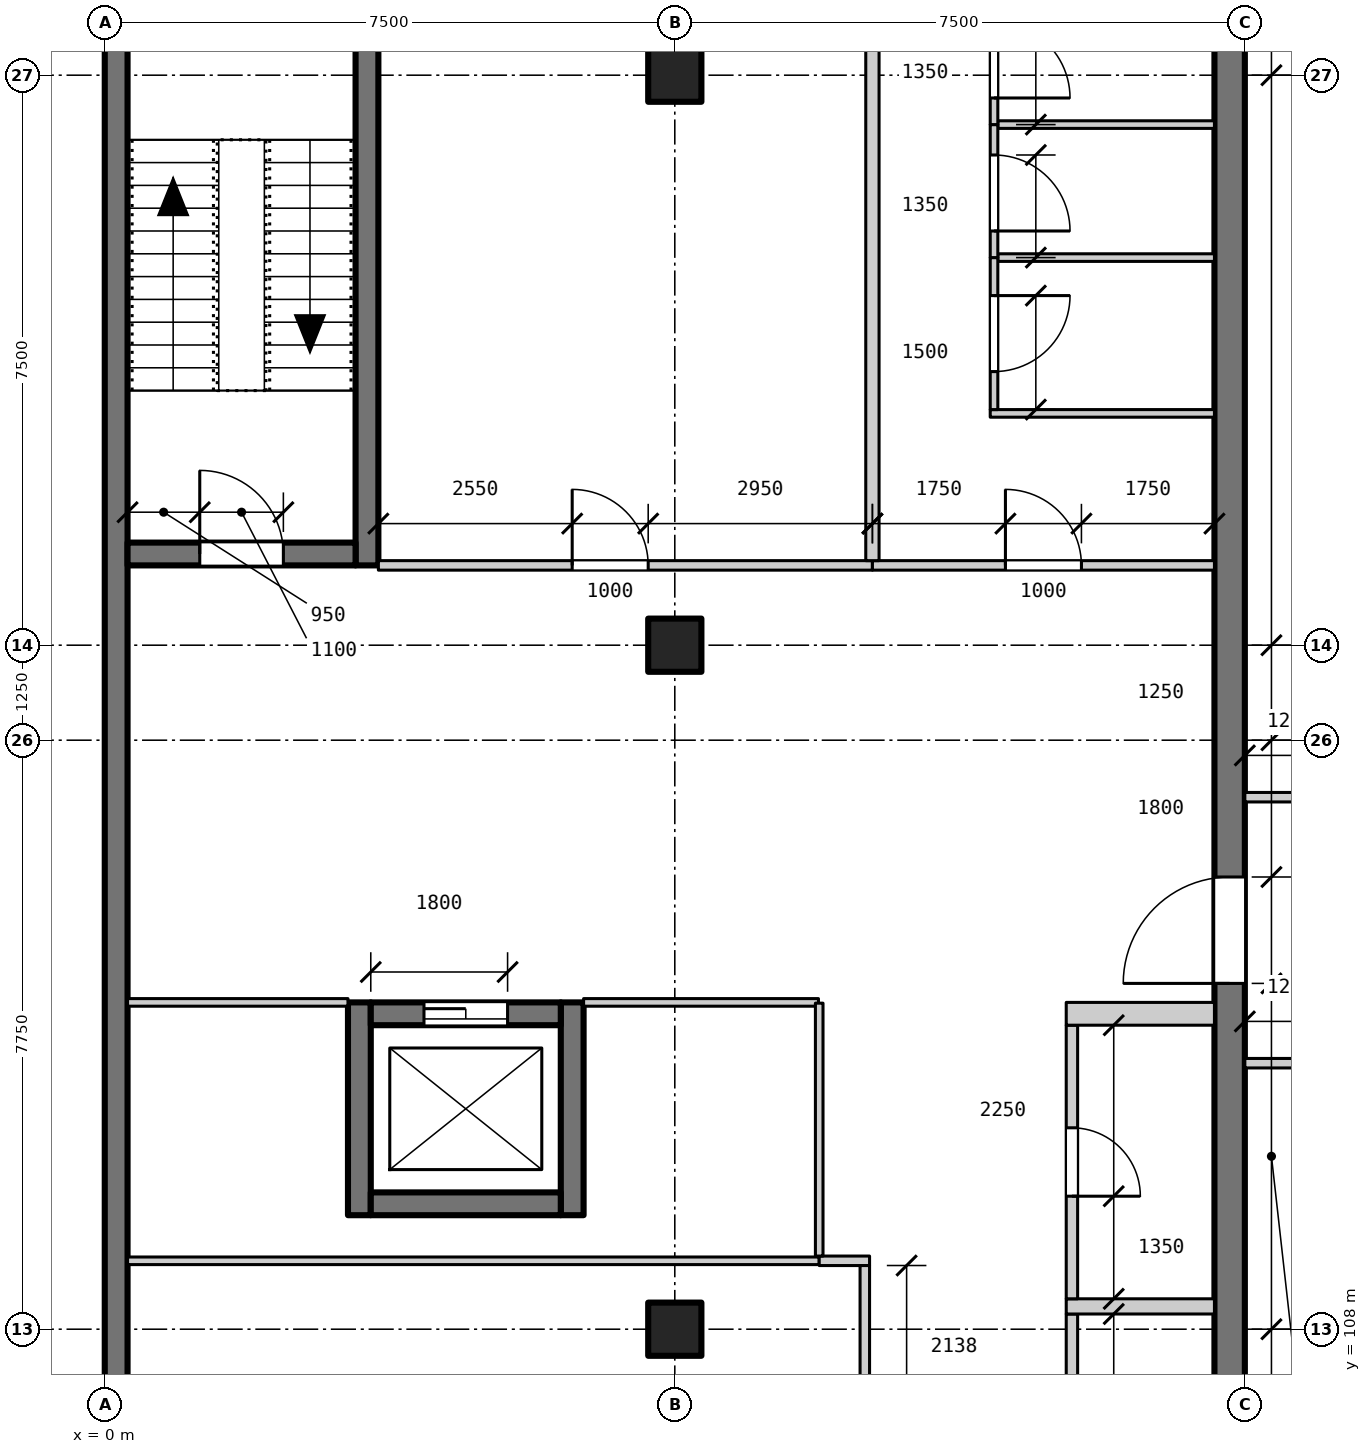
"""IFC4 building model, lengths in metres.
Left out: names, types, materials, properties, quantities, classifications, styles, units other than length and angle.
Written with IfcOpenShell. Run it as: python <this file> out.ifc"""

import sys

from ifc_helpers import new_model, si_unit, direction, frame, frame_2d, origin, origin_2d, place, context, subcontext, project, spatial, rectangle, extrude, element, fill, save


model = new_model("IFC4")
c1 = context("Model", 3, precision=1e-05, world=origin(), true_north=direction((0.0, 1.0)))
c2 = subcontext(c1, "Body", "Model", "MODEL_VIEW")
j1 = project(units=[si_unit("LENGTHUNIT", "METRE"), si_unit("PLANEANGLEUNIT", "RADIAN")], contexts=[c1])
p1 = place(None, origin())
s1 = spatial("IfcSite", under=j1, at=p1, CompositionType="ELEMENT")
p2 = place(p1, origin())
s2 = spatial("IfcBuilding", under=s1, at=p2, CompositionType="ELEMENT")
p3 = place(p2, frame((0.0, 0.0, 6.0)))
s3 = spatial("IfcBuildingStorey", under=s2, at=p3, CompositionType="ELEMENT", Elevation=6.0)
for number, where, z_axis, x_axis in (
    (1, (7.5, 108.0, 0.0), (0.0, 0.0, 1.0), (1.0, 0.0, 0.0)),
    (2, (7.5, 117.0, 0.0), (0.0, 0.0, 1.0), (1.0, 0.0, 0.0)),
    (3, (7.5, 124.5, 0.0), (0.0, 0.0, 1.0), (1.0, 0.0, 0.0)),
):
    element("IfcColumn", number, at=place(p3, frame(where, z_axis=z_axis, x_axis=x_axis)), inside=s3, PredefinedType="COLUMN", context=c2, shape_type="SweptSolid", body=[
        extrude(rectangle(XDim=0.7, YDim=0.7, at=origin_2d()), origin(), (0.0, 0.0, 1.0), 3.9),
    ])
p4 = place(p3, frame((0.15, 18.0, 0.0), z_axis=(0.0, 0.0, 1.0), x_axis=(0.0, 1.0, 0.0)))
e4 = element("IfcWall", 4, at=p4, inside=s3, PredefinedType="SHEAR", context=c2, shape_type="SweptSolid", body=[
    extrude(rectangle(XDim=108.0, YDim=0.3, at=frame_2d((54.0, 0.0))), origin(), (0.0, 0.0, 1.0), 4.2),
])
p5 = place(p3, frame((14.8, 99.0, 0.0), z_axis=(0.0, 0.0, 1.0), x_axis=(0.0, 1.0, 0.0)))
e5 = element("IfcWall", 5, at=p5, inside=s3, PredefinedType="SHEAR", context=c2, shape_type="SweptSolid", body=[
    extrude(rectangle(XDim=26.55, YDim=0.4, at=frame_2d((13.275, 0.0))), origin(), (0.0, 0.0, 1.0), 4.2),
])
p6 = place(p5, frame((13.55, 0.0, 0.0)))
e6 = element("IfcOpeningElement", 6, at=p6, cuts=e5, PredefinedType="OPENING", context=c2, shape_type="SweptSolid", body=[
    extrude(rectangle(XDim=1.4, YDim=2.4, at=frame_2d((0.7, 1.2))), frame((0.0, 0.21, 0.0), z_axis=(0.0, -1.0, 0.0), x_axis=(1.0, 0.0, 0.0)), (0.0, 0.0, 1.0), 0.42),
])
p7 = place(p3, frame((3.45, 118.05, 0.0), z_axis=(0.0, 0.0, 1.0), x_axis=(0.0, 1.0, 0.0)))
e7 = element("IfcWall", 7, at=p7, inside=s3, PredefinedType="SHEAR", context=c2, shape_type="SweptSolid", body=[
    extrude(rectangle(XDim=7.5, YDim=0.3, at=frame_2d((3.75, 0.0))), origin(), (0.0, 0.0, 1.0), 4.2),
])
p8 = place(p3, frame((0.3, 118.2, 0.0), z_axis=(0.0, 0.0, 1.0), x_axis=(1.0, 0.0, 0.0)))
e8 = element("IfcWall", 8, at=p8, inside=s3, PredefinedType="SHEAR", context=c2, shape_type="SweptSolid", body=[
    extrude(rectangle(XDim=3.0, YDim=0.3, at=frame_2d((1.5, 0.0))), origin(), (0.0, 0.0, 1.0), 4.2),
])
p9 = place(p8, frame((0.95, 0.0, 0.0)))
e9 = element("IfcOpeningElement", 9, at=p9, cuts=e8, PredefinedType="OPENING", context=c2, shape_type="SweptSolid", body=[
    extrude(rectangle(XDim=1.1, YDim=2.1, at=frame_2d((0.55, 1.05))), frame((0.0, 0.16, 0.0), z_axis=(0.0, -1.0, 0.0), x_axis=(1.0, 0.0, 0.0)), (0.0, 0.0, 1.0), 0.32),
])
for number, where, z_axis, x_axis in (
    (10, (3.35, 109.5, 0.0), (0.0, 0.0, 1.0), (0.0, 1.0, 0.0)),
    (11, (6.15, 109.5, 0.0), (0.0, 0.0, 1.0), (0.0, 1.0, 0.0)),
):
    element("IfcWall", number, at=place(p3, frame(where, z_axis=z_axis, x_axis=x_axis)), inside=s3, PredefinedType="SHEAR", context=c2, shape_type="SweptSolid", body=[
        extrude(rectangle(XDim=2.8, YDim=0.3, at=frame_2d((1.4, 0.0))), origin(), (0.0, 0.0, 1.0), 4.2),
    ])
p10 = place(p3, frame((3.5, 109.65, 0.0), z_axis=(0.0, 0.0, 1.0), x_axis=(1.0, 0.0, 0.0)))
e12 = element("IfcWall", 12, at=p10, inside=s3, PredefinedType="SHEAR", context=c2, shape_type="SweptSolid", body=[
    extrude(rectangle(XDim=2.5, YDim=0.3, at=frame_2d((1.25, 0.0))), origin(), (0.0, 0.0, 1.0), 4.2),
])
p11 = place(p3, frame((3.5, 112.15, 0.0), z_axis=(0.0, 0.0, 1.0), x_axis=(1.0, 0.0, 0.0)))
e13 = element("IfcWall", 13, at=p11, inside=s3, PredefinedType="SHEAR", context=c2, shape_type="SweptSolid", body=[
    extrude(rectangle(XDim=2.5, YDim=0.3, at=frame_2d((1.25, 0.0))), origin(), (0.0, 0.0, 1.0), 4.2),
])
p12 = place(p11, frame((0.7, 0.0, 0.0)))
e14 = element("IfcOpeningElement", 14, at=p12, cuts=e13, PredefinedType="OPENING", context=c2, shape_type="SweptSolid", body=[
    extrude(rectangle(XDim=1.1, YDim=2.1, at=frame_2d((0.55, 1.05))), frame((0.0, 0.16, 0.0), z_axis=(0.0, -1.0, 0.0), x_axis=(1.0, 0.0, 0.0)), (0.0, 0.0, 1.0), 0.32),
])
p13 = place(p3, frame((12.725, 104.4, 0.0), z_axis=(0.0, 0.0, 1.0), x_axis=(0.0, 1.0, 0.0)))
e15 = element("IfcWall", 15, at=p13, inside=s3, PredefinedType="PARTITIONING", context=c2, shape_type="SweptSolid", body=[
    extrude(rectangle(XDim=3.8, YDim=0.15, at=frame_2d((1.9, 0.0))), origin(), (0.0, 0.0, 1.0), 3.9),
])
p14 = place(p13, frame((1.45, 0.0, 0.0)))
e16 = element("IfcOpeningElement", 16, at=p14, cuts=e15, PredefinedType="OPENING", context=c2, shape_type="SweptSolid", body=[
    extrude(rectangle(XDim=0.9, YDim=2.1, at=frame_2d((0.45, 1.05))), frame((0.0, 0.085, 0.0), z_axis=(0.0, -1.0, 0.0), x_axis=(1.0, 0.0, 0.0)), (0.0, 0.0, 1.0), 0.17),
])
p15 = place(p3, frame((12.65, 108.3, 0.0), z_axis=(0.0, 0.0, 1.0), x_axis=(1.0, 0.0, 0.0)))
e17 = element("IfcWall", 17, at=p15, inside=s3, PredefinedType="PARTITIONING", context=c2, shape_type="SweptSolid", body=[
    extrude(rectangle(XDim=1.95, YDim=0.2, at=frame_2d((0.975, 0.0))), origin(), (0.0, 0.0, 1.0), 3.9),
])
p16 = place(p3, frame((12.725, 108.4, 0.0), z_axis=(0.0, 0.0, 1.0), x_axis=(0.0, 1.0, 0.0)))
e18 = element("IfcWall", 18, at=p16, inside=s3, PredefinedType="PARTITIONING", context=c2, shape_type="SweptSolid", body=[
    extrude(rectangle(XDim=3.6, YDim=0.15, at=frame_2d((1.8, 0.0))), origin(), (0.0, 0.0, 1.0), 3.9),
])
p17 = place(p16, frame((1.35, 0.0, 0.0)))
e19 = element("IfcOpeningElement", 19, at=p17, cuts=e18, PredefinedType="OPENING", context=c2, shape_type="SweptSolid", body=[
    extrude(rectangle(XDim=0.9, YDim=2.1, at=frame_2d((0.45, 1.05))), frame((0.0, 0.085, 0.0), z_axis=(0.0, -1.0, 0.0), x_axis=(1.0, 0.0, 0.0)), (0.0, 0.0, 1.0), 0.17),
])
p18 = place(p3, frame((12.65, 112.15, 0.0), z_axis=(0.0, 0.0, 1.0), x_axis=(1.0, 0.0, 0.0)))
e20 = element("IfcWall", 20, at=p18, inside=s3, PredefinedType="PARTITIONING", context=c2, shape_type="SweptSolid", body=[
    extrude(rectangle(XDim=1.95, YDim=0.3, at=frame_2d((0.975, 0.0))), origin(), (0.0, 0.0, 1.0), 3.9),
])
p19 = place(p3, frame((0.3, 108.9, 0.0), z_axis=(0.0, 0.0, 1.0), x_axis=(1.0, 0.0, 0.0)))
e21 = element("IfcWall", 21, at=p19, inside=s3, PredefinedType="PARTITIONING", context=c2, shape_type="SweptSolid", body=[
    extrude(rectangle(XDim=9.1, YDim=0.1, at=frame_2d((4.55, 0.0))), origin(), (0.0, 0.0, 1.0), 3.9),
])
p20 = place(p3, frame((9.4, 108.9, 0.0), z_axis=(0.0, 0.0, 1.0), x_axis=(1.0, 0.0, 0.0)))
e22 = element("IfcWall", 22, at=p20, inside=s3, PredefinedType="PARTITIONING", context=c2, shape_type="SweptSolid", body=[
    extrude(rectangle(XDim=0.663, YDim=0.125, at=frame_2d((0.331, 0.0))), origin(), (0.0, 0.0, 1.0), 3.9),
])
p21 = place(p3, frame((15.0, 111.5, 0.0), z_axis=(0.0, 0.0, 1.0), x_axis=(1.0, 0.0, 0.0)))
e23 = element("IfcWall", 23, at=p21, inside=s3, PredefinedType="PARTITIONING", context=c2, shape_type="SweptSolid", body=[
    extrude(rectangle(XDim=14.0, YDim=0.125, at=frame_2d((7.0, 0.0))), origin(), (0.0, 0.0, 1.0), 3.9),
])
p22 = place(p21, frame((1.2, 0.0, 0.0)))
e24 = element("IfcOpeningElement", 24, at=p22, cuts=e23, PredefinedType="OPENING", context=c2, shape_type="SweptSolid", body=[
    extrude(rectangle(XDim=1.8, YDim=2.1, at=frame_2d((0.9, 1.05))), frame((0.0, 0.073, 0.0), z_axis=(0.0, -1.0, 0.0), x_axis=(1.0, 0.0, 0.0)), (0.0, 0.0, 1.0), 0.145),
])
p23 = place(p21, frame((11.0, 0.0, 0.0)))
e25 = element("IfcOpeningElement", 25, at=p23, cuts=e23, PredefinedType="OPENING", context=c2, shape_type="SweptSolid", body=[
    extrude(rectangle(XDim=1.8, YDim=2.1, at=frame_2d((0.9, 1.05))), frame((0.0, 0.073, 0.0), z_axis=(0.0, -1.0, 0.0), x_axis=(1.0, 0.0, 0.0)), (0.0, 0.0, 1.0), 0.145),
])
p24 = place(p3, frame((0.3, 112.3, 0.0), z_axis=(0.0, 0.0, 1.0), x_axis=(1.0, 0.0, 0.0)))
e26 = element("IfcWall", 26, at=p24, inside=s3, PredefinedType="PARTITIONING", context=c2, shape_type="SweptSolid", body=[
    extrude(rectangle(XDim=2.9, YDim=0.1, at=frame_2d((1.45, 0.0))), origin(), (0.0, 0.0, 1.0), 3.9),
])
p25 = place(p3, frame((6.3, 112.3, 0.0), z_axis=(0.0, 0.0, 1.0), x_axis=(1.0, 0.0, 0.0)))
e27 = element("IfcWall", 27, at=p25, inside=s3, PredefinedType="PARTITIONING", context=c2, shape_type="SweptSolid", body=[
    extrude(rectangle(XDim=3.09, YDim=0.1, at=frame_2d((1.545, 0.0))), origin(), (0.0, 0.0, 1.0), 3.9),
])
p26 = place(p3, frame((15.0, 115.0, 0.0), z_axis=(0.0, 0.0, 1.0), x_axis=(1.0, 0.0, 0.0)))
e28 = element("IfcWall", 28, at=p26, inside=s3, PredefinedType="PARTITIONING", context=c2, shape_type="SweptSolid", body=[
    extrude(rectangle(XDim=14.0, YDim=0.125, at=frame_2d((7.0, 0.0))), origin(), (0.0, 0.0, 1.0), 3.9),
])
p27 = place(p26, frame((1.2, 0.0, 0.0)))
e29 = element("IfcOpeningElement", 29, at=p27, cuts=e28, PredefinedType="OPENING", context=c2, shape_type="SweptSolid", body=[
    extrude(rectangle(XDim=1.8, YDim=2.1, at=frame_2d((0.9, 1.05))), frame((0.0, 0.073, 0.0), z_axis=(0.0, -1.0, 0.0), x_axis=(1.0, 0.0, 0.0)), (0.0, 0.0, 1.0), 0.145),
])
p28 = place(p26, frame((11.0, 0.0, 0.0)))
e30 = element("IfcOpeningElement", 30, at=p28, cuts=e28, PredefinedType="OPENING", context=c2, shape_type="SweptSolid", body=[
    extrude(rectangle(XDim=1.8, YDim=2.1, at=frame_2d((0.9, 1.05))), frame((0.0, 0.073, 0.0), z_axis=(0.0, -1.0, 0.0), x_axis=(1.0, 0.0, 0.0)), (0.0, 0.0, 1.0), 0.145),
])
p29 = place(p3, frame((3.6, 118.05, 0.0), z_axis=(0.0, 0.0, 1.0), x_axis=(1.0, 0.0, 0.0)))
e31 = element("IfcWall", 31, at=p29, inside=s3, PredefinedType="PARTITIONING", context=c2, shape_type="SweptSolid", body=[
    extrude(rectangle(XDim=6.5, YDim=0.125, at=frame_2d((3.25, 0.0))), origin(), (0.0, 0.0, 1.0), 3.9),
])
p30 = place(p29, frame((2.55, 0.0, 0.0)))
e32 = element("IfcOpeningElement", 32, at=p30, cuts=e31, PredefinedType="OPENING", context=c2, shape_type="SweptSolid", body=[
    extrude(rectangle(XDim=1.0, YDim=2.1, at=frame_2d((0.5, 1.05))), frame((0.0, 0.073, 0.0), z_axis=(0.0, -1.0, 0.0), x_axis=(1.0, 0.0, 0.0)), (0.0, 0.0, 1.0), 0.145),
])
p31 = place(p3, frame((10.1, 118.05, 0.0), z_axis=(0.0, 0.0, 1.0), x_axis=(1.0, 0.0, 0.0)))
e33 = element("IfcWall", 33, at=p31, inside=s3, PredefinedType="PARTITIONING", context=c2, shape_type="SweptSolid", body=[
    extrude(rectangle(XDim=4.5, YDim=0.125, at=frame_2d((2.25, 0.0))), origin(), (0.0, 0.0, 1.0), 3.9),
])
p32 = place(p31, frame((1.75, 0.0, 0.0)))
e34 = element("IfcOpeningElement", 34, at=p32, cuts=e33, PredefinedType="OPENING", context=c2, shape_type="SweptSolid", body=[
    extrude(rectangle(XDim=1.0, YDim=2.1, at=frame_2d((0.5, 1.05))), frame((0.0, 0.073, 0.0), z_axis=(0.0, -1.0, 0.0), x_axis=(1.0, 0.0, 0.0)), (0.0, 0.0, 1.0), 0.145),
])
p33 = place(p3, frame((11.65, 120.05, 0.0), z_axis=(0.0, 0.0, 1.0), x_axis=(1.0, 0.0, 0.0)))
e35 = element("IfcWall", 35, at=p33, inside=s3, PredefinedType="PARTITIONING", context=c2, shape_type="SweptSolid", body=[
    extrude(rectangle(XDim=2.95, YDim=0.1, at=frame_2d((1.475, 0.0))), origin(), (0.0, 0.0, 1.0), 3.9),
])
for number, where, z_axis, x_axis in (
    (36, (11.75, 122.1, 0.0), (0.0, 0.0, 1.0), (1.0, 0.0, 0.0)),
    (37, (11.75, 123.85, 0.0), (0.0, 0.0, 1.0), (1.0, 0.0, 0.0)),
):
    element("IfcWall", number, at=place(p3, frame(where, z_axis=z_axis, x_axis=x_axis)), inside=s3, PredefinedType="PARTITIONING", context=c2, shape_type="SweptSolid", body=[
        extrude(rectangle(XDim=2.85, YDim=0.1, at=frame_2d((1.425, 0.0))), origin(), (0.0, 0.0, 1.0), 3.9),
    ])
p34 = place(p3, frame((9.4, 108.962, 0.0), z_axis=(0.0, 0.0, 1.0), x_axis=(0.0, 1.0, 0.0)))
e38 = element("IfcWall", 38, at=p34, inside=s3, PredefinedType="PARTITIONING", context=c2, shape_type="SweptSolid", body=[
    extrude(rectangle(XDim=3.328, YDim=0.1, at=frame_2d((1.664, 0.0))), origin(), (0.0, 0.0, 1.0), 3.9),
])
p35 = place(p3, frame((10.0, 103.6, 0.0), z_axis=(0.0, 0.0, 1.0), x_axis=(0.0, 1.0, 0.0)))
e39 = element("IfcWall", 39, at=p35, inside=s3, PredefinedType="PARTITIONING", context=c2, shape_type="SweptSolid", body=[
    extrude(rectangle(XDim=5.237, YDim=0.125, at=frame_2d((2.619, 0.0))), origin(), (0.0, 0.0, 1.0), 3.9),
])
p36 = place(p35, frame((2.1, 0.0, 0.0)))
e40 = element("IfcOpeningElement", 40, at=p36, cuts=e39, PredefinedType="OPENING", context=c2, shape_type="SweptSolid", body=[
    extrude(rectangle(XDim=1.0, YDim=2.1, at=frame_2d((0.5, 1.05))), frame((0.0, 0.073, 0.0), z_axis=(0.0, -1.0, 0.0), x_axis=(1.0, 0.0, 0.0)), (0.0, 0.0, 1.0), 0.145),
])
p37 = place(p3, frame((10.1, 118.113, 0.0), z_axis=(0.0, 0.0, 1.0), x_axis=(0.0, 1.0, 0.0)))
e41 = element("IfcWall", 41, at=p37, inside=s3, PredefinedType="PARTITIONING", context=c2, shape_type="SweptSolid", body=[
    extrude(rectangle(XDim=7.438, YDim=0.175, at=frame_2d((3.719, 0.0))), origin(), (0.0, 0.0, 1.0), 3.9),
])
p38 = place(p3, frame((11.7, 120.1, 0.0), z_axis=(0.0, 0.0, 1.0), x_axis=(0.0, 1.0, 0.0)))
e42 = element("IfcWall", 42, at=p38, inside=s3, PredefinedType="PARTITIONING", context=c2, shape_type="SweptSolid", body=[
    extrude(rectangle(XDim=2.0, YDim=0.1, at=frame_2d((1.0, 0.0))), origin(), (0.0, 0.0, 1.0), 3.9),
])
p39 = place(p38, frame((0.5, 0.0, 0.0)))
e43 = element("IfcOpeningElement", 43, at=p39, cuts=e42, PredefinedType="OPENING", context=c2, shape_type="SweptSolid", body=[
    extrude(rectangle(XDim=1.0, YDim=2.1, at=frame_2d((0.5, 1.05))), frame((0.0, 0.06, 0.0), z_axis=(0.0, -1.0, 0.0), x_axis=(1.0, 0.0, 0.0)), (0.0, 0.0, 1.0), 0.12),
])
p40 = place(p3, frame((11.7, 122.1, 0.0), z_axis=(0.0, 0.0, 1.0), x_axis=(0.0, 1.0, 0.0)))
e44 = element("IfcWall", 44, at=p40, inside=s3, PredefinedType="PARTITIONING", context=c2, shape_type="SweptSolid", body=[
    extrude(rectangle(XDim=1.75, YDim=0.1, at=frame_2d((0.875, 0.0))), origin(), (0.0, 0.0, 1.0), 3.9),
])
p41 = place(p40, frame((0.35, 0.0, 0.0)))
e45 = element("IfcOpeningElement", 45, at=p41, cuts=e44, PredefinedType="OPENING", context=c2, shape_type="SweptSolid", body=[
    extrude(rectangle(XDim=1.0, YDim=2.1, at=frame_2d((0.5, 1.05))), frame((0.0, 0.06, 0.0), z_axis=(0.0, -1.0, 0.0), x_axis=(1.0, 0.0, 0.0)), (0.0, 0.0, 1.0), 0.12),
])
p42 = place(p3, frame((11.7, 123.85, 0.0), z_axis=(0.0, 0.0, 1.0), x_axis=(0.0, 1.0, 0.0)))
e46 = element("IfcWall", 46, at=p42, inside=s3, PredefinedType="PARTITIONING", context=c2, shape_type="SweptSolid", body=[
    extrude(rectangle(XDim=1.7, YDim=0.1, at=frame_2d((0.85, 0.0))), origin(), (0.0, 0.0, 1.0), 3.9),
])
p43 = place(p42, frame((0.35, 0.0, 0.0)))
e47 = element("IfcOpeningElement", 47, at=p43, cuts=e46, PredefinedType="OPENING", context=c2, shape_type="SweptSolid", body=[
    extrude(rectangle(XDim=1.0, YDim=2.1, at=frame_2d((0.5, 1.05))), frame((0.0, 0.06, 0.0), z_axis=(0.0, -1.0, 0.0), x_axis=(1.0, 0.0, 0.0)), (0.0, 0.0, 1.0), 0.12),
])
p44 = place(p17, frame((0.9, 0.0, 0.0), z_axis=(0.0, 0.0, 1.0), x_axis=(-1.0, 0.0, 0.0)))
e48 = element("IfcDoor", 48, at=p44, inside=s3, OperationType="SINGLE_SWING_RIGHT", PredefinedType="DOOR", context=c2, shape_type="SweptSolid", body=[
    extrude(rectangle(XDim=0.9, YDim=2.1, at=frame_2d((0.45, 1.05))), frame((0.0, 0.025, 0.0), z_axis=(0.0, -1.0, 0.0), x_axis=(1.0, 0.0, 0.0)), (0.0, 0.0, 1.0), 0.05),
])
fill(e19, e48)
p45 = place(p6, origin())
e49 = element("IfcDoor", 49, at=p45, inside=s3, OperationType="SINGLE_SWING_LEFT", PredefinedType="DOOR", context=c2, shape_type="SweptSolid", body=[
    extrude(rectangle(XDim=1.4, YDim=2.4, at=frame_2d((0.7, 1.2))), frame((0.0, 0.025, 0.0), z_axis=(0.0, -1.0, 0.0), x_axis=(1.0, 0.0, 0.0)), (0.0, 0.0, 1.0), 0.05),
])
fill(e6, e49)
p46 = place(p30, origin())
e50 = element("IfcDoor", 50, at=p46, inside=s3, OperationType="SINGLE_SWING_LEFT", PredefinedType="DOOR", context=c2, shape_type="SweptSolid", body=[
    extrude(rectangle(XDim=1.0, YDim=2.1, at=frame_2d((0.5, 1.05))), frame((0.0, 0.025, 0.0), z_axis=(0.0, -1.0, 0.0), x_axis=(1.0, 0.0, 0.0)), (0.0, 0.0, 1.0), 0.05),
])
fill(e32, e50)
p47 = place(p32, origin())
e51 = element("IfcDoor", 51, at=p47, inside=s3, OperationType="SINGLE_SWING_LEFT", PredefinedType="DOOR", context=c2, shape_type="SweptSolid", body=[
    extrude(rectangle(XDim=1.0, YDim=2.1, at=frame_2d((0.5, 1.05))), frame((0.0, 0.025, 0.0), z_axis=(0.0, -1.0, 0.0), x_axis=(1.0, 0.0, 0.0)), (0.0, 0.0, 1.0), 0.05),
])
fill(e34, e51)
p48 = place(p39, frame((1.0, 0.0, 0.0), z_axis=(0.0, 0.0, 1.0), x_axis=(-1.0, 0.0, 0.0)))
e52 = element("IfcDoor", 52, at=p48, inside=s3, OperationType="SINGLE_SWING_LEFT", PredefinedType="DOOR", context=c2, shape_type="SweptSolid", body=[
    extrude(rectangle(XDim=1.0, YDim=2.1, at=frame_2d((0.5, 1.05))), frame((0.0, 0.025, 0.0), z_axis=(0.0, -1.0, 0.0), x_axis=(1.0, 0.0, 0.0)), (0.0, 0.0, 1.0), 0.05),
])
fill(e43, e52)
p49 = place(p41, frame((1.0, 0.0, 0.0), z_axis=(0.0, 0.0, 1.0), x_axis=(-1.0, 0.0, 0.0)))
e53 = element("IfcDoor", 53, at=p49, inside=s3, OperationType="SINGLE_SWING_RIGHT", PredefinedType="DOOR", context=c2, shape_type="SweptSolid", body=[
    extrude(rectangle(XDim=1.0, YDim=2.1, at=frame_2d((0.5, 1.05))), frame((0.0, 0.025, 0.0), z_axis=(0.0, -1.0, 0.0), x_axis=(1.0, 0.0, 0.0)), (0.0, 0.0, 1.0), 0.05),
])
fill(e45, e53)
p50 = place(p43, frame((1.0, 0.0, 0.0), z_axis=(0.0, 0.0, 1.0), x_axis=(-1.0, 0.0, 0.0)))
e54 = element("IfcDoor", 54, at=p50, inside=s3, OperationType="SINGLE_SWING_RIGHT", PredefinedType="DOOR", context=c2, shape_type="SweptSolid", body=[
    extrude(rectangle(XDim=1.0, YDim=2.1, at=frame_2d((0.5, 1.05))), frame((0.0, 0.025, 0.0), z_axis=(0.0, -1.0, 0.0), x_axis=(1.0, 0.0, 0.0)), (0.0, 0.0, 1.0), 0.05),
])
fill(e47, e54)
p51 = place(p9, origin())
e55 = element("IfcDoor", 55, at=p51, inside=s3, OperationType="SINGLE_SWING_LEFT", PredefinedType="DOOR", context=c2, shape_type="SweptSolid", body=[
    extrude(rectangle(XDim=1.1, YDim=2.1, at=frame_2d((0.55, 1.05))), frame((0.0, 0.025, 0.0), z_axis=(0.0, -1.0, 0.0), x_axis=(1.0, 0.0, 0.0)), (0.0, 0.0, 1.0), 0.05),
])
fill(e9, e55)
p52 = place(p12, origin())
e56 = element("IfcDoor", 56, at=p52, inside=s3, OperationType="SLIDING_TO_LEFT", PredefinedType="DOOR", context=c2, shape_type="SweptSolid", body=[
    extrude(rectangle(XDim=1.1, YDim=2.1, at=frame_2d((0.55, 1.05))), frame((0.0, 0.025, 0.0), z_axis=(0.0, -1.0, 0.0), x_axis=(1.0, 0.0, 0.0)), (0.0, 0.0, 1.0), 0.05),
])
fill(e14, e56)
save(model, sys.argv[1])
